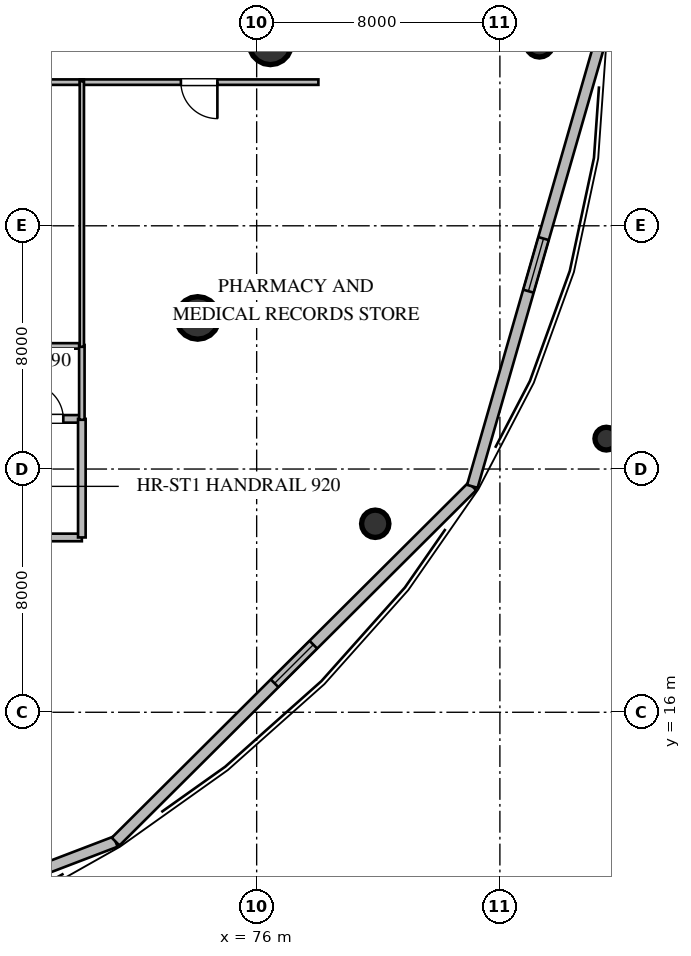
"""IFC4 building model, lengths in metres.
Left out: names, types, materials, properties, quantities, classifications, styles, units other than length and angle.
Written with IfcOpenShell. Run it as: python <this file> out.ifc"""

import sys

from ifc_helpers import new_model, si_unit, direction, frame, frame_2d, origin, origin_2d, place, context, subcontext, project, spatial, rectangle, circle, extrude, element, fill, save


model = new_model("IFC4")
c1 = context("Model", 3, precision=1e-05, world=origin(), true_north=direction((0.0, 1.0)))
c2 = subcontext(c1, "Body", "Model", "MODEL_VIEW")
j1 = project(units=[si_unit("LENGTHUNIT", "METRE"), si_unit("PLANEANGLEUNIT", "RADIAN")], contexts=[c1])
p1 = place(None, origin())
s1 = spatial("IfcSite", under=j1, at=p1, CompositionType="ELEMENT")
p2 = place(p1, origin())
s2 = spatial("IfcBuilding", under=s1, at=p2, CompositionType="ELEMENT")
p3 = place(p2, frame((0.0, 0.0, 4.8)))
s3 = spatial("IfcBuildingStorey", under=s2, at=p3, CompositionType="ELEMENT", Elevation=4.8)
for number, where, z_axis, x_axis in (
    (1, (76.45, 38.0, 0.0), (0.0, 0.0, 1.0), (1.0, 0.0, 0.0)),
    (2, (74.06, 28.97, 0.0), (0.0, 0.0, 1.0), (1.0, 0.0, 0.0)),
):
    element("IfcColumn", number, at=place(p3, frame(where, z_axis=z_axis, x_axis=x_axis)), inside=s3, PredefinedType="COLUMN", context=c2, shape_type="SweptSolid", body=[
        extrude(circle(Radius=0.7, at=origin_2d()), origin(), (0.0, 0.0, 1.0), 4.8),
    ])
for number, where, z_axis, x_axis in (
    (3, (85.3, 38.0, 0.0), (0.0, 0.0, 1.0), (1.0, 0.0, 0.0)),
    (4, (79.9, 22.2, 0.0), (0.0, 0.0, 1.0), (1.0, 0.0, 0.0)),
):
    element("IfcColumn", number, at=place(p3, frame(where, z_axis=z_axis, x_axis=x_axis)), inside=s3, PredefinedType="COLUMN", context=c2, shape_type="SweptSolid", body=[
        extrude(circle(Radius=0.45, at=origin_2d()), origin(), (0.0, 0.0, 1.0), 4.8),
    ])
p4 = place(p3, frame((87.5, 25.0, 0.0), z_axis=(0.0, 0.0, 1.0), x_axis=(1.0, 0.0, 0.0)))
e5 = element("IfcColumn", 5, at=p4, inside=s3, PredefinedType="COLUMN", context=c2, shape_type="SweptSolid", body=[
    extrude(circle(Radius=0.375, at=origin_2d()), origin(), (0.0, 0.0, 1.0), 4.8),
])
p5 = place(p3, frame((54.408, 5.262, 0.0), z_axis=(0.0, 0.0, 1.0), x_axis=(0.934014086565, 0.357236176917, 0.0)))
e6 = element("IfcWall", 6, at=p5, inside=s3, PredefinedType="STANDARD", context=c2, shape_type="SweptSolid", body=[
    extrude(rectangle(XDim=18.151, YDim=0.36, at=frame_2d((9.075, 0.0))), origin(), (0.0, 0.0, 1.0), 4.52),
])
p6 = place(p5, frame((8.175, 0.0, 1.05)))
e7 = element("IfcOpeningElement", 7, at=p6, cuts=e6, PredefinedType="OPENING", context=c2, shape_type="SweptSolid", body=[
    extrude(rectangle(XDim=1.8, YDim=1.7, at=frame_2d((0.9, 0.85))), frame((0.0, 0.19, 0.0), z_axis=(0.0, -1.0, 0.0), x_axis=(1.0, 0.0, 0.0)), (0.0, 0.0, 1.0), 0.38),
])
p7 = place(p3, frame((71.361, 11.746, 0.0), z_axis=(0.0, 0.0, 1.0), x_axis=(0.708557675059, 0.705652904135, 0.0)))
e8 = element("IfcWall", 8, at=p7, inside=s3, PredefinedType="STANDARD", context=c2, shape_type="SweptSolid", body=[
    extrude(rectangle(XDim=16.557, YDim=0.36, at=frame_2d((8.279, 0.0))), origin(), (0.0, 0.0, 1.0), 4.52),
])
p8 = place(p7, frame((7.379, 0.0, 1.05)))
e9 = element("IfcOpeningElement", 9, at=p8, cuts=e8, PredefinedType="OPENING", context=c2, shape_type="SweptSolid", body=[
    extrude(rectangle(XDim=1.8, YDim=1.7, at=frame_2d((0.9, 0.85))), frame((0.0, 0.19, 0.0), z_axis=(0.0, -1.0, 0.0), x_axis=(1.0, 0.0, 0.0)), (0.0, 0.0, 1.0), 0.38),
])
p9 = place(p3, frame((83.093, 23.43, 0.0), z_axis=(0.0, 0.0, 1.0), x_axis=(0.276192699339, 0.961102280109, 0.0)))
e10 = element("IfcWall", 10, at=p9, inside=s3, PredefinedType="STANDARD", context=c2, shape_type="SweptSolid", body=[
    extrude(rectangle(XDim=15.16, YDim=0.36, at=frame_2d((7.58, 0.0))), origin(), (0.0, 0.0, 1.0), 4.52),
])
p10 = place(p9, frame((6.68, 0.0, 1.05)))
e11 = element("IfcOpeningElement", 11, at=p10, cuts=e10, PredefinedType="OPENING", context=c2, shape_type="SweptSolid", body=[
    extrude(rectangle(XDim=1.8, YDim=1.7, at=frame_2d((0.9, 0.85))), frame((0.0, 0.19, 0.0), z_axis=(0.0, -1.0, 0.0), x_axis=(1.0, 0.0, 0.0)), (0.0, 0.0, 1.0), 0.38),
])
p11 = place(p3, frame((62.35, 25.65, 0.0), z_axis=(0.0, 0.0, 1.0), x_axis=(1.0, 0.0, 0.0)))
e12 = element("IfcWall", 12, at=p11, inside=s3, PredefinedType="SOLIDWALL", context=c2, shape_type="SweptSolid", body=[
    extrude(rectangle(XDim=7.9, YDim=0.25, at=frame_2d((3.95, 0.0))), origin(), (0.0, 0.0, 1.0), 4.52),
])
p12 = place(p11, frame((6.14, 0.0, 0.0)))
e13 = element("IfcOpeningElement", 13, at=p12, cuts=e12, PredefinedType="OPENING", context=c2, shape_type="SweptSolid", body=[
    extrude(rectangle(XDim=1.15, YDim=2.1, at=frame_2d((0.575, 1.05))), frame((0.0, 0.135, 0.0), z_axis=(0.0, -1.0, 0.0), x_axis=(1.0, 0.0, 0.0)), (0.0, 0.0, 1.0), 0.27),
])
p13 = place(p3, frame((62.35, 21.75, 0.0), z_axis=(0.0, 0.0, 1.0), x_axis=(1.0, 0.0, 0.0)))
e14 = element("IfcWall", 14, at=p13, inside=s3, PredefinedType="SOLIDWALL", context=c2, shape_type="SweptSolid", body=[
    extrude(rectangle(XDim=7.9, YDim=0.25, at=frame_2d((3.95, 0.0))), origin(), (0.0, 0.0, 1.0), 4.52),
])
p14 = place(p3, frame((70.25, 21.75, 0.0), z_axis=(0.0, 0.0, 1.0), x_axis=(0.0, 1.0, 0.0)))
e15 = element("IfcWall", 15, at=p14, inside=s3, PredefinedType="SOLIDWALL", context=c2, shape_type="SweptSolid", body=[
    extrude(rectangle(XDim=3.9, YDim=0.25, at=frame_2d((1.95, 0.0))), origin(), (0.0, 0.0, 1.0), 4.52),
])
p15 = place(p3, frame((70.315, 36.725, 0.0), z_axis=(0.0, 0.0, 1.0), x_axis=(-1.0, 0.0, 0.0)))
e16 = element("IfcWall", 16, at=p15, inside=s3, PredefinedType="PARTITIONING", context=c2, shape_type="SweptSolid", body=[
    extrude(rectangle(XDim=23.62, YDim=0.18, at=frame_2d((11.81, 0.0))), origin(), (0.0, 0.0, 1.0), 4.05),
])
p16 = place(p15, frame((11.21, 0.0, 0.0)))
e17 = element("IfcOpeningElement", 17, at=p16, cuts=e16, PredefinedType="OPENING", context=c2, shape_type="SweptSolid", body=[
    extrude(rectangle(XDim=1.2, YDim=2.15, at=frame_2d((0.6, 1.075))), frame((0.0, 0.1, 0.0), z_axis=(0.0, -1.0, 0.0), x_axis=(1.0, 0.0, 0.0)), (0.0, 0.0, 1.0), 0.2),
])
p17 = place(p3, frame((46.695, 28.05, 0.0), z_axis=(0.0, 0.0, 1.0), x_axis=(1.0, 0.0, 0.0)))
e18 = element("IfcWall", 18, at=p17, inside=s3, PredefinedType="PARTITIONING", context=c2, shape_type="SweptSolid", body=[
    extrude(rectangle(XDim=23.585, YDim=0.18, at=frame_2d((11.792, 0.0))), origin(), (0.0, 0.0, 1.0), 4.05),
])
p18 = place(p3, frame((78.03, 36.725, 0.0), z_axis=(0.0, 0.0, 1.0), x_axis=(-1.0, 0.0, 0.0)))
e19 = element("IfcWall", 19, at=p18, inside=s3, PredefinedType="PARTITIONING", context=c2, shape_type="SweptSolid", body=[
    extrude(rectangle(XDim=7.845, YDim=0.18, at=frame_2d((3.922, 0.0))), origin(), (0.0, 0.0, 1.0), 4.52),
])
p19 = place(p18, frame((3.322, 0.0, 0.0)))
e20 = element("IfcOpeningElement", 20, at=p19, cuts=e19, PredefinedType="OPENING", context=c2, shape_type="SweptSolid", body=[
    extrude(rectangle(XDim=1.2, YDim=2.15, at=frame_2d((0.6, 1.075))), frame((0.0, 0.1, 0.0), z_axis=(0.0, -1.0, 0.0), x_axis=(1.0, 0.0, 0.0)), (0.0, 0.0, 1.0), 0.2),
])
p20 = place(p3, frame((70.25, 28.08, 0.0), z_axis=(0.0, 0.0, 1.0), x_axis=(0.0, -1.0, 0.0)))
e21 = element("IfcWall", 21, at=p20, inside=s3, PredefinedType="PARTITIONING", context=c2, shape_type="SweptSolid", body=[
    extrude(rectangle(XDim=2.46, YDim=0.18, at=frame_2d((1.23, 0.0))), origin(), (0.0, 0.0, 1.0), 4.52),
])
p21 = place(p3, frame((70.25, 36.755, 0.0), z_axis=(0.0, 0.0, 1.0), x_axis=(0.0, -1.0, 0.0)))
e22 = element("IfcWall", 22, at=p21, inside=s3, PredefinedType="PARTITIONING", context=c2, shape_type="SweptSolid", body=[
    extrude(rectangle(XDim=8.735, YDim=0.14, at=frame_2d((4.367, 0.0))), origin(), (0.0, 0.0, 1.0), 4.52),
])
p22 = place(p8, origin())
e23 = element("IfcWindow", 23, at=p22, inside=s3, PartitioningType="SINGLE_PANEL", PredefinedType="WINDOW", context=c2, shape_type="SweptSolid", body=[
    extrude(rectangle(XDim=1.8, YDim=1.7, at=frame_2d((0.9, 0.85))), frame((0.0, 0.03, 0.0), z_axis=(0.0, -1.0, 0.0), x_axis=(1.0, 0.0, 0.0)), (0.0, 0.0, 1.0), 0.06),
])
fill(e9, e23)
p23 = place(p10, origin())
e24 = element("IfcWindow", 24, at=p23, inside=s3, PartitioningType="SINGLE_PANEL", PredefinedType="WINDOW", context=c2, shape_type="SweptSolid", body=[
    extrude(rectangle(XDim=1.8, YDim=1.7, at=frame_2d((0.9, 0.85))), frame((0.0, 0.03, 0.0), z_axis=(0.0, -1.0, 0.0), x_axis=(1.0, 0.0, 0.0)), (0.0, 0.0, 1.0), 0.06),
])
fill(e11, e24)
p24 = place(p12, origin())
e25 = element("IfcDoor", 25, at=p24, inside=s3, OperationType="SINGLE_SWING_LEFT", PredefinedType="DOOR", context=c2, shape_type="SweptSolid", body=[
    extrude(rectangle(XDim=1.15, YDim=2.1, at=frame_2d((0.575, 1.05))), frame((0.0, 0.025, 0.0), z_axis=(0.0, -1.0, 0.0), x_axis=(1.0, 0.0, 0.0)), (0.0, 0.0, 1.0), 0.05),
])
fill(e13, e25)
p25 = place(p19, origin())
e26 = element("IfcDoor", 26, at=p25, inside=s3, OperationType="SINGLE_SWING_LEFT", PredefinedType="DOOR", context=c2, shape_type="SweptSolid", body=[
    extrude(rectangle(XDim=1.2, YDim=2.15, at=frame_2d((0.6, 1.075))), frame((0.0, 0.025, 0.0), z_axis=(0.0, -1.0, 0.0), x_axis=(1.0, 0.0, 0.0)), (0.0, 0.0, 1.0), 0.05),
])
fill(e20, e26)
save(model, sys.argv[1])
